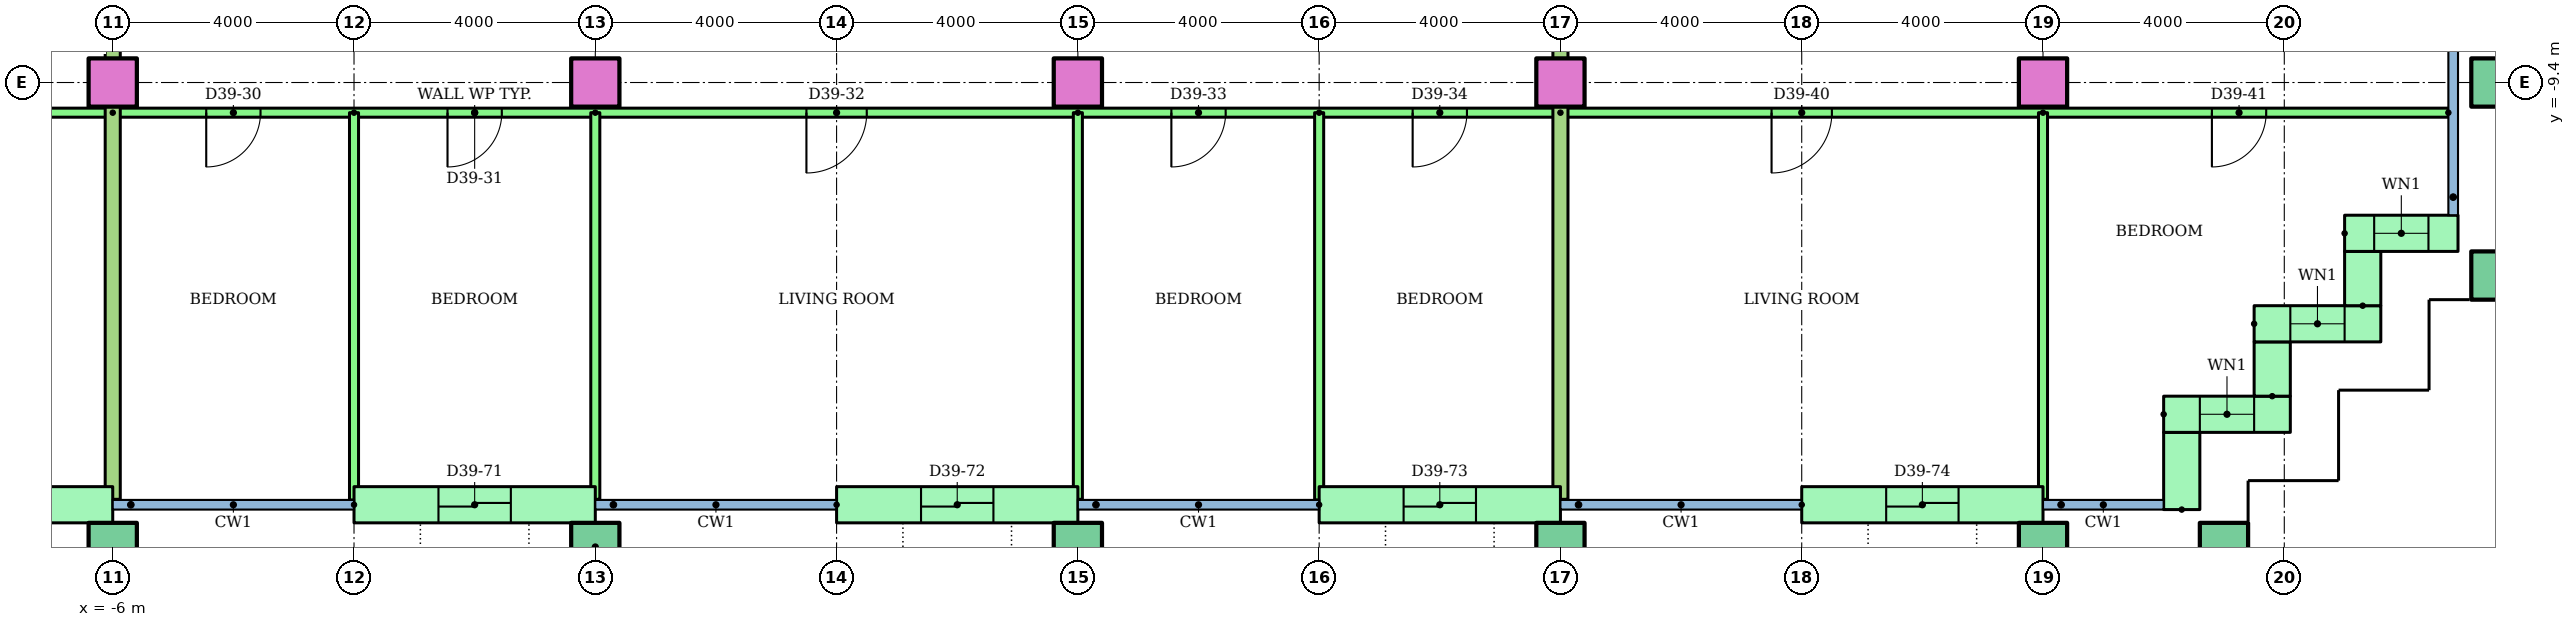
"""IFC4 building model, lengths in metres.
Left out: names, types, materials, properties, quantities, classifications, styles, units other than length and angle.
Written with IfcOpenShell. Run it as: python <this file> out.ifc"""

import sys

from ifc_helpers import new_model, si_unit, direction, frame, frame_2d, origin, origin_2d, place, context, subcontext, project, spatial, rectangle, hollow_rectangle, extrude, element, fill, save


model = new_model("IFC4")
c1 = context("Model", 3, precision=1e-05, world=origin(), true_north=direction((0.0, 1.0)))
c2 = subcontext(c1, "Body", "Model", "MODEL_VIEW")
j1 = project(units=[si_unit("LENGTHUNIT", "METRE"), si_unit("PLANEANGLEUNIT", "RADIAN")], contexts=[c1])
p1 = place(None, origin())
s1 = spatial("IfcSite", under=j1, at=p1, CompositionType="ELEMENT")
p2 = place(p1, origin())
s2 = spatial("IfcBuilding", under=s1, at=p2, CompositionType="ELEMENT")
p3 = place(p2, frame((0.0, 0.0, 148.6)))
s3 = spatial("IfcBuildingStorey", under=s2, at=p3, CompositionType="ELEMENT", Elevation=148.6)
for number, where in (
    (1, (-6.0, -17.1, 0.0)),
    (2, (2.0, -17.1, 0.0)),
    (3, (10.0, -17.1, 0.0)),
    (4, (18.0, -17.1, 0.0)),
    (5, (26.0, -17.1, 0.0)),
    (6, (29.0, -17.1, 0.0)),
    (7, (33.5, -12.6, 0.0)),
):
    element("IfcColumn", number, at=place(p3, frame(where)), inside=s3, PredefinedType="COLUMN", context=c2, shape_type="SweptSolid", body=[
        extrude(hollow_rectangle(XDim=0.8, YDim=0.8, WallThickness=0.04, at=origin_2d()), origin(), (0.0, 0.0, 1.0), 3.2),
    ])
for number, where in (
    (8, (-6.0, -9.4, 0.0)),
    (9, (2.0, -9.4, 0.0)),
    (10, (10.0, -9.4, 0.0)),
    (11, (18.0, -9.4, 0.0)),
    (12, (26.0, -9.4, 0.0)),
):
    element("IfcColumn", number, at=place(p3, frame(where)), inside=s3, PredefinedType="COLUMN", context=c2, shape_type="SweptSolid", body=[
        extrude(rectangle(XDim=0.8, YDim=0.8, at=origin_2d()), origin(), (0.0, 0.0, 1.0), 3.2),
    ])
p4 = place(p3, frame((33.5, -9.4, 0.0)))
e13 = element("IfcColumn", 13, at=p4, inside=s3, PredefinedType="COLUMN", context=c2, shape_type="SweptSolid", body=[
    extrude(hollow_rectangle(XDim=0.8, YDim=0.8, WallThickness=0.04, at=origin_2d()), origin(), (0.0, 0.0, 1.0), 3.2),
])
p5 = place(p3, frame((-10.0, -16.4, 0.0)))
e14 = element("IfcWall", 14, at=p5, inside=s3, PredefinedType="STANDARD", context=c2, shape_type="SweptSolid", body=[
    extrude(rectangle(XDim=4.0, YDim=0.6, at=frame_2d((2.0, 0.0))), origin(), (0.0, 0.0, 1.0), 2.8),
])
p6 = place(p5, frame((1.4, 0.0, 0.0)))
e15 = element("IfcOpeningElement", 15, at=p6, cuts=e14, PredefinedType="OPENING", context=c2, shape_type="SweptSolid", body=[
    extrude(rectangle(XDim=1.2, YDim=2.1, at=frame_2d((0.6, 1.05))), frame((0.0, 0.31, 0.0), z_axis=(0.0, -1.0, 0.0), x_axis=(1.0, 0.0, 0.0)), (0.0, 0.0, 1.0), 0.62),
])
p7 = place(p3, frame((-2.0, -16.4, 0.0)))
e16 = element("IfcWall", 16, at=p7, inside=s3, PredefinedType="STANDARD", context=c2, shape_type="SweptSolid", body=[
    extrude(rectangle(XDim=4.0, YDim=0.6, at=frame_2d((2.0, 0.0))), origin(), (0.0, 0.0, 1.0), 2.8),
])
p8 = place(p7, frame((1.4, 0.0, 0.0)))
e17 = element("IfcOpeningElement", 17, at=p8, cuts=e16, PredefinedType="OPENING", context=c2, shape_type="SweptSolid", body=[
    extrude(rectangle(XDim=1.2, YDim=2.1, at=frame_2d((0.6, 1.05))), frame((0.0, 0.31, 0.0), z_axis=(0.0, -1.0, 0.0), x_axis=(1.0, 0.0, 0.0)), (0.0, 0.0, 1.0), 0.62),
])
p9 = place(p3, frame((6.0, -16.4, 0.0)))
e18 = element("IfcWall", 18, at=p9, inside=s3, PredefinedType="STANDARD", context=c2, shape_type="SweptSolid", body=[
    extrude(rectangle(XDim=4.0, YDim=0.6, at=frame_2d((2.0, 0.0))), origin(), (0.0, 0.0, 1.0), 2.8),
])
p10 = place(p9, frame((1.4, 0.0, 0.0)))
e19 = element("IfcOpeningElement", 19, at=p10, cuts=e18, PredefinedType="OPENING", context=c2, shape_type="SweptSolid", body=[
    extrude(rectangle(XDim=1.2, YDim=2.1, at=frame_2d((0.6, 1.05))), frame((0.0, 0.31, 0.0), z_axis=(0.0, -1.0, 0.0), x_axis=(1.0, 0.0, 0.0)), (0.0, 0.0, 1.0), 0.62),
])
p11 = place(p3, frame((14.0, -16.4, 0.0)))
e20 = element("IfcWall", 20, at=p11, inside=s3, PredefinedType="STANDARD", context=c2, shape_type="SweptSolid", body=[
    extrude(rectangle(XDim=4.0, YDim=0.6, at=frame_2d((2.0, 0.0))), origin(), (0.0, 0.0, 1.0), 2.8),
])
p12 = place(p11, frame((1.4, 0.0, 0.0)))
e21 = element("IfcOpeningElement", 21, at=p12, cuts=e20, PredefinedType="OPENING", context=c2, shape_type="SweptSolid", body=[
    extrude(rectangle(XDim=1.2, YDim=2.1, at=frame_2d((0.6, 1.05))), frame((0.0, 0.31, 0.0), z_axis=(0.0, -1.0, 0.0), x_axis=(1.0, 0.0, 0.0)), (0.0, 0.0, 1.0), 0.62),
])
p13 = place(p3, frame((22.0, -16.4, 0.0)))
e22 = element("IfcWall", 22, at=p13, inside=s3, PredefinedType="STANDARD", context=c2, shape_type="SweptSolid", body=[
    extrude(rectangle(XDim=4.0, YDim=0.6, at=frame_2d((2.0, 0.0))), origin(), (0.0, 0.0, 1.0), 2.8),
])
p14 = place(p13, frame((1.4, 0.0, 0.0)))
e23 = element("IfcOpeningElement", 23, at=p14, cuts=e22, PredefinedType="OPENING", context=c2, shape_type="SweptSolid", body=[
    extrude(rectangle(XDim=1.2, YDim=2.1, at=frame_2d((0.6, 1.05))), frame((0.0, 0.31, 0.0), z_axis=(0.0, -1.0, 0.0), x_axis=(1.0, 0.0, 0.0)), (0.0, 0.0, 1.0), 0.62),
])
p15 = place(p3, frame((28.3, -16.48, 0.0), z_axis=(0.0, 0.0, 1.0), x_axis=(0.0, 1.0, 0.0)))
e24 = element("IfcWall", 24, at=p15, inside=s3, PredefinedType="STANDARD", context=c2, shape_type="SweptSolid", body=[
    extrude(rectangle(XDim=1.28, YDim=0.6, at=frame_2d((0.64, 0.0))), origin(), (0.0, 0.0, 1.0), 2.8),
])
p16 = place(p3, frame((28.0, -14.9, 0.0)))
e25 = element("IfcWall", 25, at=p16, inside=s3, PredefinedType="STANDARD", context=c2, shape_type="SweptSolid", body=[
    extrude(rectangle(XDim=2.1, YDim=0.6, at=frame_2d((1.05, 0.0))), origin(), (0.0, 0.0, 1.0), 2.8),
])
p17 = place(p16, frame((0.6, 0.0, 0.9)))
e26 = element("IfcOpeningElement", 26, at=p17, cuts=e25, PredefinedType="OPENING", context=c2, shape_type="SweptSolid", body=[
    extrude(rectangle(XDim=0.9, YDim=1.5, at=frame_2d((0.45, 0.75))), frame((0.0, 0.31, 0.0), z_axis=(0.0, -1.0, 0.0), x_axis=(1.0, 0.0, 0.0)), (0.0, 0.0, 1.0), 0.62),
])
p18 = place(p3, frame((29.8, -14.6, 0.0), z_axis=(0.0, 0.0, 1.0), x_axis=(0.0, 1.0, 0.0)))
e27 = element("IfcWall", 27, at=p18, inside=s3, PredefinedType="STANDARD", context=c2, shape_type="SweptSolid", body=[
    extrude(rectangle(XDim=0.9, YDim=0.6, at=frame_2d((0.45, 0.0))), origin(), (0.0, 0.0, 1.0), 2.8),
])
p19 = place(p3, frame((29.5, -13.4, 0.0)))
e28 = element("IfcWall", 28, at=p19, inside=s3, PredefinedType="STANDARD", context=c2, shape_type="SweptSolid", body=[
    extrude(rectangle(XDim=2.1, YDim=0.6, at=frame_2d((1.05, 0.0))), origin(), (0.0, 0.0, 1.0), 2.8),
])
p20 = place(p19, frame((0.6, 0.0, 0.9)))
e29 = element("IfcOpeningElement", 29, at=p20, cuts=e28, PredefinedType="OPENING", context=c2, shape_type="SweptSolid", body=[
    extrude(rectangle(XDim=0.9, YDim=1.5, at=frame_2d((0.45, 0.75))), frame((0.0, 0.31, 0.0), z_axis=(0.0, -1.0, 0.0), x_axis=(1.0, 0.0, 0.0)), (0.0, 0.0, 1.0), 0.62),
])
p21 = place(p3, frame((31.3, -13.1, 0.0), z_axis=(0.0, 0.0, 1.0), x_axis=(0.0, 1.0, 0.0)))
e30 = element("IfcWall", 30, at=p21, inside=s3, PredefinedType="STANDARD", context=c2, shape_type="SweptSolid", body=[
    extrude(rectangle(XDim=0.9, YDim=0.6, at=frame_2d((0.45, 0.0))), origin(), (0.0, 0.0, 1.0), 2.8),
])
p22 = place(p3, frame((31.0, -11.9, 0.0)))
e31 = element("IfcWall", 31, at=p22, inside=s3, PredefinedType="STANDARD", context=c2, shape_type="SweptSolid", body=[
    extrude(rectangle(XDim=1.88, YDim=0.6, at=frame_2d((0.94, 0.0))), origin(), (0.0, 0.0, 1.0), 2.8),
])
p23 = place(p22, frame((0.49, 0.0, 0.9)))
e32 = element("IfcOpeningElement", 32, at=p23, cuts=e31, PredefinedType="OPENING", context=c2, shape_type="SweptSolid", body=[
    extrude(rectangle(XDim=0.9, YDim=1.5, at=frame_2d((0.45, 0.75))), frame((0.0, 0.31, 0.0), z_axis=(0.0, -1.0, 0.0), x_axis=(1.0, 0.0, 0.0)), (0.0, 0.0, 1.0), 0.62),
])
p24 = place(p3, frame((-6.0, -9.9, 0.0), z_axis=(0.0, 0.0, 1.0), x_axis=(-1.0, 0.0, 0.0)))
e33 = element("IfcWall", 33, at=p24, inside=s3, PredefinedType="PARTITIONING", context=c2, shape_type="SweptSolid", body=[
    extrude(rectangle(XDim=26.72, YDim=0.15, at=frame_2d((13.36, 0.0))), origin(), (0.0, 0.0, 1.0), 2.4),
])
p25 = place(p24, frame((20.75, 0.0, 0.0)))
e34 = element("IfcOpeningElement", 34, at=p25, cuts=e33, PredefinedType="OPENING", context=c2, shape_type="SweptSolid", body=[
    extrude(rectangle(XDim=1.0, YDim=2.1, at=frame_2d((0.5, 1.05))), frame((0.0, 0.085, 0.0), z_axis=(0.0, -1.0, 0.0), x_axis=(1.0, 0.0, 0.0)), (0.0, 0.0, 1.0), 0.17),
])
p26 = place(p24, frame((13.55, 0.0, 0.0)))
e35 = element("IfcOpeningElement", 35, at=p26, cuts=e33, PredefinedType="OPENING", context=c2, shape_type="SweptSolid", body=[
    extrude(rectangle(XDim=0.9, YDim=2.1, at=frame_2d((0.45, 1.05))), frame((0.0, 0.085, 0.0), z_axis=(0.0, -1.0, 0.0), x_axis=(1.0, 0.0, 0.0)), (0.0, 0.0, 1.0), 0.17),
])
p27 = place(p24, frame((9.55, 0.0, 0.0)))
e36 = element("IfcOpeningElement", 36, at=p27, cuts=e33, PredefinedType="OPENING", context=c2, shape_type="SweptSolid", body=[
    extrude(rectangle(XDim=0.9, YDim=2.1, at=frame_2d((0.45, 1.05))), frame((0.0, 0.085, 0.0), z_axis=(0.0, -1.0, 0.0), x_axis=(1.0, 0.0, 0.0)), (0.0, 0.0, 1.0), 0.17),
])
p28 = place(p24, frame((5.55, 0.0, 0.0)))
e37 = element("IfcOpeningElement", 37, at=p28, cuts=e33, PredefinedType="OPENING", context=c2, shape_type="SweptSolid", body=[
    extrude(rectangle(XDim=0.9, YDim=2.1, at=frame_2d((0.45, 1.05))), frame((0.0, 0.085, 0.0), z_axis=(0.0, -1.0, 0.0), x_axis=(1.0, 0.0, 0.0)), (0.0, 0.0, 1.0), 0.17),
])
p29 = place(p24, frame((1.55, 0.0, 0.0)))
e38 = element("IfcOpeningElement", 38, at=p29, cuts=e33, PredefinedType="OPENING", context=c2, shape_type="SweptSolid", body=[
    extrude(rectangle(XDim=0.9, YDim=2.1, at=frame_2d((0.45, 1.05))), frame((0.0, 0.085, 0.0), z_axis=(0.0, -1.0, 0.0), x_axis=(1.0, 0.0, 0.0)), (0.0, 0.0, 1.0), 0.17),
])
p30 = place(p3, frame((18.0, -9.9, 0.0), z_axis=(0.0, 0.0, 1.0), x_axis=(-1.0, 0.0, 0.0)))
e39 = element("IfcWall", 39, at=p30, inside=s3, PredefinedType="PARTITIONING", context=c2, shape_type="SweptSolid", body=[
    extrude(rectangle(XDim=24.0, YDim=0.15, at=frame_2d((12.0, 0.0))), origin(), (0.0, 0.0, 1.0), 2.4),
])
p31 = place(p30, frame((21.55, 0.0, 0.0)))
e40 = element("IfcOpeningElement", 40, at=p31, cuts=e39, PredefinedType="OPENING", context=c2, shape_type="SweptSolid", body=[
    extrude(rectangle(XDim=0.9, YDim=2.1, at=frame_2d((0.45, 1.05))), frame((0.0, 0.085, 0.0), z_axis=(0.0, -1.0, 0.0), x_axis=(1.0, 0.0, 0.0)), (0.0, 0.0, 1.0), 0.17),
])
p32 = place(p30, frame((17.55, 0.0, 0.0)))
e41 = element("IfcOpeningElement", 41, at=p32, cuts=e39, PredefinedType="OPENING", context=c2, shape_type="SweptSolid", body=[
    extrude(rectangle(XDim=0.9, YDim=2.1, at=frame_2d((0.45, 1.05))), frame((0.0, 0.085, 0.0), z_axis=(0.0, -1.0, 0.0), x_axis=(1.0, 0.0, 0.0)), (0.0, 0.0, 1.0), 0.17),
])
p33 = place(p30, frame((11.5, 0.0, 0.0)))
e42 = element("IfcOpeningElement", 42, at=p33, cuts=e39, PredefinedType="OPENING", context=c2, shape_type="SweptSolid", body=[
    extrude(rectangle(XDim=1.0, YDim=2.1, at=frame_2d((0.5, 1.05))), frame((0.0, 0.085, 0.0), z_axis=(0.0, -1.0, 0.0), x_axis=(1.0, 0.0, 0.0)), (0.0, 0.0, 1.0), 0.17),
])
p34 = place(p30, frame((5.55, 0.0, 0.0)))
e43 = element("IfcOpeningElement", 43, at=p34, cuts=e39, PredefinedType="OPENING", context=c2, shape_type="SweptSolid", body=[
    extrude(rectangle(XDim=0.9, YDim=2.1, at=frame_2d((0.45, 1.05))), frame((0.0, 0.085, 0.0), z_axis=(0.0, -1.0, 0.0), x_axis=(1.0, 0.0, 0.0)), (0.0, 0.0, 1.0), 0.17),
])
p35 = place(p30, frame((1.55, 0.0, 0.0)))
e44 = element("IfcOpeningElement", 44, at=p35, cuts=e39, PredefinedType="OPENING", context=c2, shape_type="SweptSolid", body=[
    extrude(rectangle(XDim=0.9, YDim=2.1, at=frame_2d((0.45, 1.05))), frame((0.0, 0.085, 0.0), z_axis=(0.0, -1.0, 0.0), x_axis=(1.0, 0.0, 0.0)), (0.0, 0.0, 1.0), 0.17),
])
p36 = place(p3, frame((-2.0, -9.9, 0.0), z_axis=(0.0, 0.0, 1.0), x_axis=(0.0, -1.0, 0.0)))
e45 = element("IfcWall", 45, at=p36, inside=s3, PredefinedType="PARTITIONING", context=c2, shape_type="SweptSolid", body=[
    extrude(rectangle(XDim=6.421, YDim=0.15, at=frame_2d((3.21, 0.0))), origin(), (0.0, 0.0, 1.0), 2.4),
])
for number, where, z_axis, x_axis in (
    (46, (2.0, -9.9, 0.0), (0.0, 0.0, 1.0), (0.0, -1.0, 0.0)),
    (47, (10.0, -9.9, 0.0), (0.0, 0.0, 1.0), (0.0, -1.0, 0.0)),
):
    element("IfcWall", number, at=place(p3, frame(where, z_axis=z_axis, x_axis=x_axis)), inside=s3, PredefinedType="PARTITIONING", context=c2, shape_type="SweptSolid", body=[
        extrude(rectangle(XDim=6.41, YDim=0.15, at=frame_2d((3.205, 0.0))), origin(), (0.0, 0.0, 1.0), 2.4),
    ])
p37 = place(p3, frame((14.0, -9.9, 0.0), z_axis=(0.0, 0.0, 1.0), x_axis=(0.0, -1.0, 0.0)))
e48 = element("IfcWall", 48, at=p37, inside=s3, PredefinedType="PARTITIONING", context=c2, shape_type="SweptSolid", body=[
    extrude(rectangle(XDim=6.421, YDim=0.15, at=frame_2d((3.21, 0.0))), origin(), (0.0, 0.0, 1.0), 2.4),
])
p38 = place(p3, frame((-6.0, -1.4, 0.0), z_axis=(0.0, 0.0, 1.0), x_axis=(0.0, -1.0, 0.0)))
e49 = element("IfcWall", 49, at=p38, inside=s3, PredefinedType="PARTITIONING", context=c2, shape_type="SweptSolid", body=[
    extrude(rectangle(XDim=14.91, YDim=0.25, at=frame_2d((7.455, 0.0))), origin(), (0.0, 0.0, 1.0), 2.4),
])
p39 = place(p3, frame((32.72, -9.9, 0.0), z_axis=(0.0, 0.0, 1.0), x_axis=(-1.0, 0.0, 0.0)))
e50 = element("IfcWall", 50, at=p39, inside=s3, PredefinedType="PARTITIONING", context=c2, shape_type="SweptSolid", body=[
    extrude(rectangle(XDim=14.72, YDim=0.15, at=frame_2d((7.36, 0.0))), origin(), (0.0, 0.0, 1.0), 2.4),
])
p40 = place(p39, frame((10.22, 0.0, 0.0)))
e51 = element("IfcOpeningElement", 51, at=p40, cuts=e50, PredefinedType="OPENING", context=c2, shape_type="SweptSolid", body=[
    extrude(rectangle(XDim=1.0, YDim=2.1, at=frame_2d((0.5, 1.05))), frame((0.0, 0.085, 0.0), z_axis=(0.0, -1.0, 0.0), x_axis=(1.0, 0.0, 0.0)), (0.0, 0.0, 1.0), 0.17),
])
p41 = place(p39, frame((3.02, 0.0, 0.0)))
e52 = element("IfcOpeningElement", 52, at=p41, cuts=e50, PredefinedType="OPENING", context=c2, shape_type="SweptSolid", body=[
    extrude(rectangle(XDim=0.9, YDim=2.1, at=frame_2d((0.45, 1.05))), frame((0.0, 0.085, 0.0), z_axis=(0.0, -1.0, 0.0), x_axis=(1.0, 0.0, 0.0)), (0.0, 0.0, 1.0), 0.17),
])
p42 = place(p3, frame((26.0, -9.9, 0.0), z_axis=(0.0, 0.0, 1.0), x_axis=(0.0, -1.0, 0.0)))
e53 = element("IfcWall", 53, at=p42, inside=s3, PredefinedType="PARTITIONING", context=c2, shape_type="SweptSolid", body=[
    extrude(rectangle(XDim=6.41, YDim=0.15, at=frame_2d((3.205, 0.0))), origin(), (0.0, 0.0, 1.0), 2.4),
])
p43 = place(p3, frame((18.0, -1.4, 0.0), z_axis=(0.0, 0.0, 1.0), x_axis=(0.0, -1.0, 0.0)))
e54 = element("IfcWall", 54, at=p43, inside=s3, PredefinedType="PARTITIONING", context=c2, shape_type="SweptSolid", body=[
    extrude(rectangle(XDim=14.91, YDim=0.25, at=frame_2d((7.455, 0.0))), origin(), (0.0, 0.0, 1.0), 2.4),
])
p44 = place(p17, origin())
e55 = element("IfcWindow", 55, at=p44, inside=s3, PartitioningType="SINGLE_PANEL", PredefinedType="WINDOW", context=c2, shape_type="SweptSolid", body=[
    extrude(rectangle(XDim=0.9, YDim=1.5, at=frame_2d((0.45, 0.75))), frame((0.0, 0.03, 0.0), z_axis=(0.0, -1.0, 0.0), x_axis=(1.0, 0.0, 0.0)), (0.0, 0.0, 1.0), 0.06),
])
fill(e26, e55)
p45 = place(p20, origin())
e56 = element("IfcWindow", 56, at=p45, inside=s3, PartitioningType="SINGLE_PANEL", PredefinedType="WINDOW", context=c2, shape_type="SweptSolid", body=[
    extrude(rectangle(XDim=0.9, YDim=1.5, at=frame_2d((0.45, 0.75))), frame((0.0, 0.03, 0.0), z_axis=(0.0, -1.0, 0.0), x_axis=(1.0, 0.0, 0.0)), (0.0, 0.0, 1.0), 0.06),
])
fill(e29, e56)
p46 = place(p23, origin())
e57 = element("IfcWindow", 57, at=p46, inside=s3, PartitioningType="SINGLE_PANEL", PredefinedType="WINDOW", context=c2, shape_type="SweptSolid", body=[
    extrude(rectangle(XDim=0.9, YDim=1.5, at=frame_2d((0.45, 0.75))), frame((0.0, 0.03, 0.0), z_axis=(0.0, -1.0, 0.0), x_axis=(1.0, 0.0, 0.0)), (0.0, 0.0, 1.0), 0.06),
])
fill(e32, e57)
p47 = place(p31, origin())
e58 = element("IfcDoor", 58, at=p47, inside=s3, OperationType="SINGLE_SWING_RIGHT", PredefinedType="DOOR", context=c2, shape_type="SweptSolid", body=[
    extrude(rectangle(XDim=0.9, YDim=2.1, at=frame_2d((0.45, 1.05))), frame((0.0, 0.025, 0.0), z_axis=(0.0, -1.0, 0.0), x_axis=(1.0, 0.0, 0.0)), (0.0, 0.0, 1.0), 0.05),
])
fill(e40, e58)
p48 = place(p32, origin())
e59 = element("IfcDoor", 59, at=p48, inside=s3, OperationType="SINGLE_SWING_RIGHT", PredefinedType="DOOR", context=c2, shape_type="SweptSolid", body=[
    extrude(rectangle(XDim=0.9, YDim=2.1, at=frame_2d((0.45, 1.05))), frame((0.0, 0.025, 0.0), z_axis=(0.0, -1.0, 0.0), x_axis=(1.0, 0.0, 0.0)), (0.0, 0.0, 1.0), 0.05),
])
fill(e41, e59)
p49 = place(p33, origin())
e60 = element("IfcDoor", 60, at=p49, inside=s3, OperationType="SINGLE_SWING_RIGHT", PredefinedType="DOOR", context=c2, shape_type="SweptSolid", body=[
    extrude(rectangle(XDim=1.0, YDim=2.1, at=frame_2d((0.5, 1.05))), frame((0.0, 0.025, 0.0), z_axis=(0.0, -1.0, 0.0), x_axis=(1.0, 0.0, 0.0)), (0.0, 0.0, 1.0), 0.05),
])
fill(e42, e60)
p50 = place(p34, origin())
e61 = element("IfcDoor", 61, at=p50, inside=s3, OperationType="SINGLE_SWING_RIGHT", PredefinedType="DOOR", context=c2, shape_type="SweptSolid", body=[
    extrude(rectangle(XDim=0.9, YDim=2.1, at=frame_2d((0.45, 1.05))), frame((0.0, 0.025, 0.0), z_axis=(0.0, -1.0, 0.0), x_axis=(1.0, 0.0, 0.0)), (0.0, 0.0, 1.0), 0.05),
])
fill(e43, e61)
p51 = place(p35, origin())
e62 = element("IfcDoor", 62, at=p51, inside=s3, OperationType="SINGLE_SWING_RIGHT", PredefinedType="DOOR", context=c2, shape_type="SweptSolid", body=[
    extrude(rectangle(XDim=0.9, YDim=2.1, at=frame_2d((0.45, 1.05))), frame((0.0, 0.025, 0.0), z_axis=(0.0, -1.0, 0.0), x_axis=(1.0, 0.0, 0.0)), (0.0, 0.0, 1.0), 0.05),
])
fill(e44, e62)
p52 = place(p40, origin())
e63 = element("IfcDoor", 63, at=p52, inside=s3, OperationType="SINGLE_SWING_RIGHT", PredefinedType="DOOR", context=c2, shape_type="SweptSolid", body=[
    extrude(rectangle(XDim=1.0, YDim=2.1, at=frame_2d((0.5, 1.05))), frame((0.0, 0.025, 0.0), z_axis=(0.0, -1.0, 0.0), x_axis=(1.0, 0.0, 0.0)), (0.0, 0.0, 1.0), 0.05),
])
fill(e51, e63)
p53 = place(p41, origin())
e64 = element("IfcDoor", 64, at=p53, inside=s3, OperationType="SINGLE_SWING_RIGHT", PredefinedType="DOOR", context=c2, shape_type="SweptSolid", body=[
    extrude(rectangle(XDim=0.9, YDim=2.1, at=frame_2d((0.45, 1.05))), frame((0.0, 0.025, 0.0), z_axis=(0.0, -1.0, 0.0), x_axis=(1.0, 0.0, 0.0)), (0.0, 0.0, 1.0), 0.05),
])
fill(e52, e64)
p54 = place(p8, origin())
e65 = element("IfcDoor", 65, at=p54, inside=s3, OperationType="SLIDING_TO_LEFT", PredefinedType="DOOR", context=c2, shape_type="SweptSolid", body=[
    extrude(rectangle(XDim=1.2, YDim=2.1, at=frame_2d((0.6, 1.05))), frame((0.0, 0.025, 0.0), z_axis=(0.0, -1.0, 0.0), x_axis=(1.0, 0.0, 0.0)), (0.0, 0.0, 1.0), 0.05),
])
fill(e17, e65)
p55 = place(p10, origin())
e66 = element("IfcDoor", 66, at=p55, inside=s3, OperationType="SLIDING_TO_LEFT", PredefinedType="DOOR", context=c2, shape_type="SweptSolid", body=[
    extrude(rectangle(XDim=1.2, YDim=2.1, at=frame_2d((0.6, 1.05))), frame((0.0, 0.025, 0.0), z_axis=(0.0, -1.0, 0.0), x_axis=(1.0, 0.0, 0.0)), (0.0, 0.0, 1.0), 0.05),
])
fill(e19, e66)
p56 = place(p12, origin())
e67 = element("IfcDoor", 67, at=p56, inside=s3, OperationType="SLIDING_TO_LEFT", PredefinedType="DOOR", context=c2, shape_type="SweptSolid", body=[
    extrude(rectangle(XDim=1.2, YDim=2.1, at=frame_2d((0.6, 1.05))), frame((0.0, 0.025, 0.0), z_axis=(0.0, -1.0, 0.0), x_axis=(1.0, 0.0, 0.0)), (0.0, 0.0, 1.0), 0.05),
])
fill(e21, e67)
p57 = place(p14, origin())
e68 = element("IfcDoor", 68, at=p57, inside=s3, OperationType="SLIDING_TO_LEFT", PredefinedType="DOOR", context=c2, shape_type="SweptSolid", body=[
    extrude(rectangle(XDim=1.2, YDim=2.1, at=frame_2d((0.6, 1.05))), frame((0.0, 0.025, 0.0), z_axis=(0.0, -1.0, 0.0), x_axis=(1.0, 0.0, 0.0)), (0.0, 0.0, 1.0), 0.05),
])
fill(e23, e68)
save(model, sys.argv[1])
